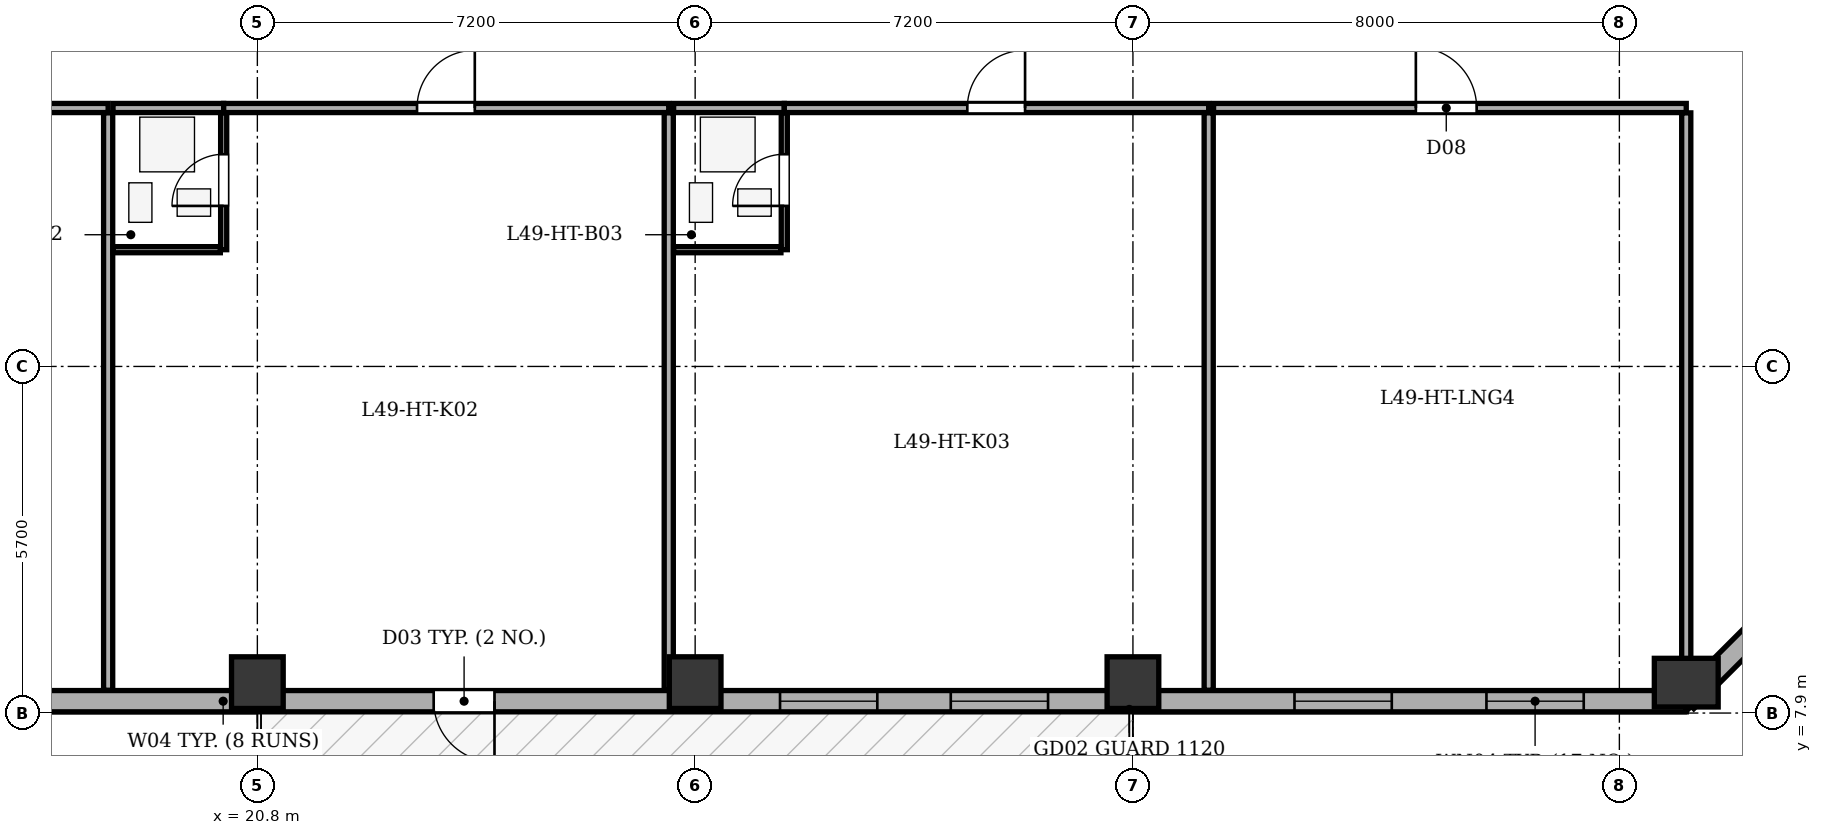
"""IFC4 building model, lengths in metres.
Left out: names, types, materials, properties, quantities, classifications, styles, units other than length and angle.
Written with IfcOpenShell. Run it as: python <this file> out.ifc"""

import sys

from ifc_helpers import new_model, si_unit, direction, frame, frame_2d, origin, origin_2d, place, context, subcontext, project, spatial, rectangle, extrude, element, fill, save


model = new_model("IFC4")
c1 = context("Model", 3, precision=1e-05, world=origin(), true_north=direction((0.0, 1.0)))
c2 = subcontext(c1, "Body", "Model", "MODEL_VIEW")
j1 = project(units=[si_unit("LENGTHUNIT", "METRE"), si_unit("PLANEANGLEUNIT", "RADIAN")], contexts=[c1])
p1 = place(None, origin())
s1 = spatial("IfcSite", under=j1, at=p1, CompositionType="ELEMENT")
p2 = place(p1, origin())
s2 = spatial("IfcBuilding", under=s1, at=p2, CompositionType="ELEMENT")
p3 = place(p2, frame((0.0, 0.0, 190.3)))
s3 = spatial("IfcBuildingStorey", under=s2, at=p3, CompositionType="ELEMENT", Elevation=190.3)
for number, where, z_axis, x_axis in (
    (1, (20.8, 8.4, 0.0), (0.0, 0.0, 1.0), (1.0, 0.0, 0.0)),
    (2, (28.0, 8.4, 0.0), (0.0, 0.0, 1.0), (1.0, 0.0, 0.0)),
    (3, (35.2, 8.4, 0.0), (0.0, 0.0, 1.0), (1.0, 0.0, 0.0)),
):
    element("IfcColumn", number, at=place(p3, frame(where, z_axis=z_axis, x_axis=x_axis)), inside=s3, PredefinedType="COLUMN", context=c2, shape_type="SweptSolid", body=[
        extrude(rectangle(XDim=0.85, YDim=0.85, at=origin_2d()), origin(), (0.0, 0.0, 1.0), 3.5),
    ])
p4 = place(p3, frame((44.3, 8.4, 0.0), z_axis=(0.0, 0.0, 1.0), x_axis=(1.0, 0.0, 0.0)))
e4 = element("IfcColumn", 4, at=p4, inside=s3, PredefinedType="COLUMN", context=c2, shape_type="SweptSolid", body=[
    extrude(rectangle(XDim=0.8, YDim=1.05, at=origin_2d()), origin(), (0.0, 0.0, 1.0), 3.5),
])
p5 = place(p3, frame((44.3, 8.095, 0.0), z_axis=(0.0, 0.0, 1.0), x_axis=(-1.0, 0.0, 0.0)))
e5 = element("IfcWall", 5, at=p5, inside=s3, PredefinedType="STANDARD", context=c2, shape_type="SweptSolid", body=[
    extrude(rectangle(XDim=35.0, YDim=0.35, at=frame_2d((17.5, 0.0))), origin(), (0.0, 0.0, 1.0), 2.785),
])
p6 = place(p5, frame((19.6, 0.0, 0.0)))
e6 = element("IfcOpeningElement", 6, at=p6, cuts=e5, PredefinedType="OPENING", context=c2, shape_type="SweptSolid", body=[
    extrude(rectangle(XDim=1.0, YDim=2.02, at=frame_2d((0.5, 1.01))), frame((0.0, 0.185, 0.0), z_axis=(0.0, -1.0, 0.0), x_axis=(1.0, 0.0, 0.0)), (0.0, 0.0, 1.0), 0.37),
])
p7 = place(p5, frame((1.686, 0.0, 0.75)))
e7 = element("IfcOpeningElement", 7, at=p7, cuts=e5, PredefinedType="OPENING", context=c2, shape_type="SweptSolid", body=[
    extrude(rectangle(XDim=1.6, YDim=1.75, at=frame_2d((0.8, 0.875))), frame((0.0, 0.185, 0.0), z_axis=(0.0, -1.0, 0.0), x_axis=(1.0, 0.0, 0.0)), (0.0, 0.0, 1.0), 0.37),
])
p8 = place(p5, frame((4.843, 0.0, 0.75)))
e8 = element("IfcOpeningElement", 8, at=p8, cuts=e5, PredefinedType="OPENING", context=c2, shape_type="SweptSolid", body=[
    extrude(rectangle(XDim=1.6, YDim=1.75, at=frame_2d((0.8, 0.875))), frame((0.0, 0.185, 0.0), z_axis=(0.0, -1.0, 0.0), x_axis=(1.0, 0.0, 0.0)), (0.0, 0.0, 1.0), 0.37),
])
p9 = place(p5, frame((10.496, 0.0, 0.75)))
e9 = element("IfcOpeningElement", 9, at=p9, cuts=e5, PredefinedType="OPENING", context=c2, shape_type="SweptSolid", body=[
    extrude(rectangle(XDim=1.6, YDim=1.75, at=frame_2d((0.8, 0.875))), frame((0.0, 0.185, 0.0), z_axis=(0.0, -1.0, 0.0), x_axis=(1.0, 0.0, 0.0)), (0.0, 0.0, 1.0), 0.37),
])
p10 = place(p5, frame((13.304, 0.0, 0.75)))
e10 = element("IfcOpeningElement", 10, at=p10, cuts=e5, PredefinedType="OPENING", context=c2, shape_type="SweptSolid", body=[
    extrude(rectangle(XDim=1.6, YDim=1.75, at=frame_2d((0.8, 0.875))), frame((0.0, 0.185, 0.0), z_axis=(0.0, -1.0, 0.0), x_axis=(1.0, 0.0, 0.0)), (0.0, 0.0, 1.0), 0.37),
])
p11 = place(p5, frame((27.525, 0.0, 0.75)))
e11 = element("IfcOpeningElement", 11, at=p11, cuts=e5, PredefinedType="OPENING", context=c2, shape_type="SweptSolid", body=[
    extrude(rectangle(XDim=1.6, YDim=1.75, at=frame_2d((0.8, 0.875))), frame((0.0, 0.185, 0.0), z_axis=(0.0, -1.0, 0.0), x_axis=(1.0, 0.0, 0.0)), (0.0, 0.0, 1.0), 0.37),
])
p12 = place(p5, frame((30.729, 0.0, 0.75)))
e12 = element("IfcOpeningElement", 12, at=p12, cuts=e5, PredefinedType="OPENING", context=c2, shape_type="SweptSolid", body=[
    extrude(rectangle(XDim=2.1, YDim=1.75, at=frame_2d((1.05, 0.875))), frame((0.0, 0.185, 0.0), z_axis=(0.0, -1.0, 0.0), x_axis=(1.0, 0.0, 0.0)), (0.0, 0.0, 1.0), 0.37),
])
p13 = place(p3, frame((49.105, 12.9, 0.0), z_axis=(0.0, 0.0, 1.0), x_axis=(-0.707106781187, -0.707106781187, 0.0)))
e13 = element("IfcWall", 13, at=p13, inside=s3, PredefinedType="STANDARD", context=c2, shape_type="SweptSolid", body=[
    extrude(rectangle(XDim=6.795, YDim=0.35, at=frame_2d((3.397, 0.0))), origin(), (0.0, 0.0, 1.0), 2.785),
])
p14 = place(p13, frame((2.698, 0.0, 0.75)))
e14 = element("IfcOpeningElement", 14, at=p14, cuts=e13, PredefinedType="OPENING", context=c2, shape_type="SweptSolid", body=[
    extrude(rectangle(XDim=1.4, YDim=1.65, at=frame_2d((0.7, 0.825))), frame((0.0, 0.185, 0.0), z_axis=(0.0, -1.0, 0.0), x_axis=(1.0, 0.0, 0.0)), (0.0, 0.0, 1.0), 0.37),
])
p15 = place(p3, frame((12.05, 17.85, 0.0), z_axis=(0.0, 0.0, 1.0), x_axis=(1.0, 0.0, 0.0)))
e15 = element("IfcWall", 15, at=p15, inside=s3, PredefinedType="PARTITIONING", context=c2, shape_type="SweptSolid", body=[
    extrude(rectangle(XDim=6.296, YDim=0.15, at=frame_2d((3.148, 0.0))), origin(), (0.0, 0.0, 1.0), 3.2),
])
p16 = place(p15, frame((2.668, 0.0, 0.0)))
e16 = element("IfcOpeningElement", 16, at=p16, cuts=e15, PredefinedType="OPENING", context=c2, shape_type="SweptSolid", body=[
    extrude(rectangle(XDim=0.95, YDim=2.1, at=frame_2d((0.475, 1.05))), frame((0.0, 0.085, 0.0), z_axis=(0.0, -1.0, 0.0), x_axis=(1.0, 0.0, 0.0)), (0.0, 0.0, 1.0), 0.17),
])
p17 = place(p3, frame((18.346, 8.275, 0.0), z_axis=(0.0, 0.0, 1.0), x_axis=(0.0, 1.0, 0.0)))
e17 = element("IfcWall", 17, at=p17, inside=s3, PredefinedType="PARTITIONING", context=c2, shape_type="SweptSolid", body=[
    extrude(rectangle(XDim=9.495, YDim=0.15, at=frame_2d((4.748, 0.0))), origin(), (0.0, 0.0, 1.0), 3.2),
])
p18 = place(p3, frame((18.426, 17.85, 0.0), z_axis=(0.0, 0.0, 1.0), x_axis=(1.0, 0.0, 0.0)))
e18 = element("IfcWall", 18, at=p18, inside=s3, PredefinedType="PARTITIONING", context=c2, shape_type="SweptSolid", body=[
    extrude(rectangle(XDim=1.82, YDim=0.15, at=frame_2d((0.91, 0.0))), origin(), (0.0, 0.0, 1.0), 3.2),
])
p19 = place(p3, frame((20.246, 17.85, 0.0), z_axis=(0.0, 0.0, 1.0), x_axis=(1.0, 0.0, 0.0)))
e19 = element("IfcWall", 19, at=p19, inside=s3, PredefinedType="PARTITIONING", context=c2, shape_type="SweptSolid", body=[
    extrude(rectangle(XDim=7.32, YDim=0.15, at=frame_2d((3.66, 0.0))), origin(), (0.0, 0.0, 1.0), 3.2),
])
p20 = place(p19, frame((3.18, 0.0, 0.0)))
e20 = element("IfcOpeningElement", 20, at=p20, cuts=e19, PredefinedType="OPENING", context=c2, shape_type="SweptSolid", body=[
    extrude(rectangle(XDim=0.95, YDim=2.1, at=frame_2d((0.475, 1.05))), frame((0.0, 0.085, 0.0), z_axis=(0.0, -1.0, 0.0), x_axis=(1.0, 0.0, 0.0)), (0.0, 0.0, 1.0), 0.17),
])
p21 = place(p3, frame((20.246, 15.52, 0.0), z_axis=(0.0, 0.0, 1.0), x_axis=(0.0, 1.0, 0.0)))
e21 = element("IfcWall", 21, at=p21, inside=s3, PredefinedType="PARTITIONING", context=c2, shape_type="SweptSolid", body=[
    extrude(rectangle(XDim=2.25, YDim=0.1, at=frame_2d((1.125, 0.0))), origin(), (0.0, 0.0, 1.0), 3.2),
])
p22 = place(p21, frame((0.72, 0.0, 0.0)))
e22 = element("IfcOpeningElement", 22, at=p22, cuts=e21, PredefinedType="OPENING", context=c2, shape_type="SweptSolid", body=[
    extrude(rectangle(XDim=0.85, YDim=2.05, at=frame_2d((0.425, 1.025))), frame((0.0, 0.06, 0.0), z_axis=(0.0, -1.0, 0.0), x_axis=(1.0, 0.0, 0.0)), (0.0, 0.0, 1.0), 0.12),
])
p23 = place(p3, frame((18.426, 15.52, 0.0), z_axis=(0.0, 0.0, 1.0), x_axis=(1.0, 0.0, 0.0)))
e23 = element("IfcWall", 23, at=p23, inside=s3, PredefinedType="PARTITIONING", context=c2, shape_type="SweptSolid", body=[
    extrude(rectangle(XDim=1.765, YDim=0.1, at=frame_2d((0.882, 0.0))), origin(), (0.0, 0.0, 1.0), 3.2),
])
p24 = place(p3, frame((27.566, 8.275, 0.0), z_axis=(0.0, 0.0, 1.0), x_axis=(0.0, 1.0, 0.0)))
e24 = element("IfcWall", 24, at=p24, inside=s3, PredefinedType="PARTITIONING", context=c2, shape_type="SweptSolid", body=[
    extrude(rectangle(XDim=9.495, YDim=0.15, at=frame_2d((4.748, 0.0))), origin(), (0.0, 0.0, 1.0), 3.2),
])
p25 = place(p3, frame((27.646, 17.85, 0.0), z_axis=(0.0, 0.0, 1.0), x_axis=(1.0, 0.0, 0.0)))
e25 = element("IfcWall", 25, at=p25, inside=s3, PredefinedType="PARTITIONING", context=c2, shape_type="SweptSolid", body=[
    extrude(rectangle(XDim=1.82, YDim=0.15, at=frame_2d((0.91, 0.0))), origin(), (0.0, 0.0, 1.0), 3.2),
])
p26 = place(p3, frame((29.466, 17.85, 0.0), z_axis=(0.0, 0.0, 1.0), x_axis=(1.0, 0.0, 0.0)))
e26 = element("IfcWall", 26, at=p26, inside=s3, PredefinedType="PARTITIONING", context=c2, shape_type="SweptSolid", body=[
    extrude(rectangle(XDim=6.98, YDim=0.15, at=frame_2d((3.49, 0.0))), origin(), (0.0, 0.0, 1.0), 3.2),
])
p27 = place(p26, frame((3.01, 0.0, 0.0)))
e27 = element("IfcOpeningElement", 27, at=p27, cuts=e26, PredefinedType="OPENING", context=c2, shape_type="SweptSolid", body=[
    extrude(rectangle(XDim=0.95, YDim=2.1, at=frame_2d((0.475, 1.05))), frame((0.0, 0.085, 0.0), z_axis=(0.0, -1.0, 0.0), x_axis=(1.0, 0.0, 0.0)), (0.0, 0.0, 1.0), 0.17),
])
p28 = place(p3, frame((29.466, 15.52, 0.0), z_axis=(0.0, 0.0, 1.0), x_axis=(0.0, 1.0, 0.0)))
e28 = element("IfcWall", 28, at=p28, inside=s3, PredefinedType="PARTITIONING", context=c2, shape_type="SweptSolid", body=[
    extrude(rectangle(XDim=2.25, YDim=0.1, at=frame_2d((1.125, 0.0))), origin(), (0.0, 0.0, 1.0), 3.2),
])
p29 = place(p28, frame((0.72, 0.0, 0.0)))
e29 = element("IfcOpeningElement", 29, at=p29, cuts=e28, PredefinedType="OPENING", context=c2, shape_type="SweptSolid", body=[
    extrude(rectangle(XDim=0.85, YDim=2.05, at=frame_2d((0.425, 1.025))), frame((0.0, 0.06, 0.0), z_axis=(0.0, -1.0, 0.0), x_axis=(1.0, 0.0, 0.0)), (0.0, 0.0, 1.0), 0.12),
])
p30 = place(p3, frame((27.646, 15.52, 0.0), z_axis=(0.0, 0.0, 1.0), x_axis=(1.0, 0.0, 0.0)))
e30 = element("IfcWall", 30, at=p30, inside=s3, PredefinedType="PARTITIONING", context=c2, shape_type="SweptSolid", body=[
    extrude(rectangle(XDim=1.765, YDim=0.1, at=frame_2d((0.882, 0.0))), origin(), (0.0, 0.0, 1.0), 3.2),
])
p31 = place(p3, frame((36.446, 8.275, 0.0), z_axis=(0.0, 0.0, 1.0), x_axis=(0.0, 1.0, 0.0)))
e31 = element("IfcWall", 31, at=p31, inside=s3, PredefinedType="PARTITIONING", context=c2, shape_type="SweptSolid", body=[
    extrude(rectangle(XDim=9.495, YDim=0.15, at=frame_2d((4.748, 0.0))), origin(), (0.0, 0.0, 1.0), 3.2),
])
p32 = place(p3, frame((36.526, 17.85, 0.0), z_axis=(0.0, 0.0, 1.0), x_axis=(1.0, 0.0, 0.0)))
e32 = element("IfcWall", 32, at=p32, inside=s3, PredefinedType="PARTITIONING", context=c2, shape_type="SweptSolid", body=[
    extrude(rectangle(XDim=7.774, YDim=0.15, at=frame_2d((3.887, 0.0))), origin(), (0.0, 0.0, 1.0), 3.2),
])
p33 = place(p32, frame((3.327, 0.0, 0.0)))
e33 = element("IfcOpeningElement", 33, at=p33, cuts=e32, PredefinedType="OPENING", context=c2, shape_type="SweptSolid", body=[
    extrude(rectangle(XDim=1.0, YDim=2.1, at=frame_2d((0.5, 1.05))), frame((0.0, 0.085, 0.0), z_axis=(0.0, -1.0, 0.0), x_axis=(1.0, 0.0, 0.0)), (0.0, 0.0, 1.0), 0.17),
])
p34 = place(p3, frame((44.3, 8.275, 0.0), z_axis=(0.0, 0.0, 1.0), x_axis=(0.0, 1.0, 0.0)))
e34 = element("IfcWall", 34, at=p34, inside=s3, PredefinedType="PARTITIONING", context=c2, shape_type="SweptSolid", body=[
    extrude(rectangle(XDim=9.495, YDim=0.15, at=frame_2d((4.748, 0.0))), origin(), (0.0, 0.0, 1.0), 3.2),
])
p35 = place(p6, origin())
e35 = element("IfcDoor", 35, at=p35, inside=s3, OperationType="SINGLE_SWING_LEFT", PredefinedType="DOOR", context=c2, shape_type="SweptSolid", body=[
    extrude(rectangle(XDim=1.0, YDim=2.02, at=frame_2d((0.5, 1.01))), frame((0.0, 0.025, 0.0), z_axis=(0.0, -1.0, 0.0), x_axis=(1.0, 0.0, 0.0)), (0.0, 0.0, 1.0), 0.05),
])
fill(e6, e35)
p36 = place(p7, origin())
e36 = element("IfcWindow", 36, at=p36, inside=s3, PartitioningType="SINGLE_PANEL", PredefinedType="WINDOW", context=c2, shape_type="SweptSolid", body=[
    extrude(rectangle(XDim=1.6, YDim=1.75, at=frame_2d((0.8, 0.875))), frame((0.0, -0.01, 0.0), z_axis=(0.0, -1.0, 0.0), x_axis=(1.0, 0.0, 0.0)), (0.0, 0.0, 1.0), 0.06),
])
fill(e7, e36)
p37 = place(p8, origin())
e37 = element("IfcWindow", 37, at=p37, inside=s3, PartitioningType="SINGLE_PANEL", PredefinedType="WINDOW", context=c2, shape_type="SweptSolid", body=[
    extrude(rectangle(XDim=1.6, YDim=1.75, at=frame_2d((0.8, 0.875))), frame((0.0, -0.01, 0.0), z_axis=(0.0, -1.0, 0.0), x_axis=(1.0, 0.0, 0.0)), (0.0, 0.0, 1.0), 0.06),
])
fill(e8, e37)
p38 = place(p9, origin())
e38 = element("IfcWindow", 38, at=p38, inside=s3, PartitioningType="SINGLE_PANEL", PredefinedType="WINDOW", context=c2, shape_type="SweptSolid", body=[
    extrude(rectangle(XDim=1.6, YDim=1.75, at=frame_2d((0.8, 0.875))), frame((0.0, -0.01, 0.0), z_axis=(0.0, -1.0, 0.0), x_axis=(1.0, 0.0, 0.0)), (0.0, 0.0, 1.0), 0.06),
])
fill(e9, e38)
p39 = place(p10, origin())
e39 = element("IfcWindow", 39, at=p39, inside=s3, PartitioningType="SINGLE_PANEL", PredefinedType="WINDOW", context=c2, shape_type="SweptSolid", body=[
    extrude(rectangle(XDim=1.6, YDim=1.75, at=frame_2d((0.8, 0.875))), frame((0.0, -0.01, 0.0), z_axis=(0.0, -1.0, 0.0), x_axis=(1.0, 0.0, 0.0)), (0.0, 0.0, 1.0), 0.06),
])
fill(e10, e39)
p40 = place(p22, origin())
e40 = element("IfcDoor", 40, at=p40, inside=s3, OperationType="SINGLE_SWING_LEFT", PredefinedType="DOOR", context=c2, shape_type="SweptSolid", body=[
    extrude(rectangle(XDim=0.85, YDim=2.05, at=frame_2d((0.425, 1.025))), frame((0.0, 0.025, 0.0), z_axis=(0.0, -1.0, 0.0), x_axis=(1.0, 0.0, 0.0)), (0.0, 0.0, 1.0), 0.05),
])
fill(e22, e40)
p41 = place(p20, origin())
e41 = element("IfcDoor", 41, at=p41, inside=s3, OperationType="SINGLE_SWING_RIGHT", PredefinedType="DOOR", context=c2, shape_type="SweptSolid", body=[
    extrude(rectangle(XDim=0.95, YDim=2.1, at=frame_2d((0.475, 1.05))), frame((0.0, 0.025, 0.0), z_axis=(0.0, -1.0, 0.0), x_axis=(1.0, 0.0, 0.0)), (0.0, 0.0, 1.0), 0.05),
])
fill(e20, e41)
p42 = place(p29, origin())
e42 = element("IfcDoor", 42, at=p42, inside=s3, OperationType="SINGLE_SWING_LEFT", PredefinedType="DOOR", context=c2, shape_type="SweptSolid", body=[
    extrude(rectangle(XDim=0.85, YDim=2.05, at=frame_2d((0.425, 1.025))), frame((0.0, 0.025, 0.0), z_axis=(0.0, -1.0, 0.0), x_axis=(1.0, 0.0, 0.0)), (0.0, 0.0, 1.0), 0.05),
])
fill(e29, e42)
p43 = place(p27, origin())
e43 = element("IfcDoor", 43, at=p43, inside=s3, OperationType="SINGLE_SWING_RIGHT", PredefinedType="DOOR", context=c2, shape_type="SweptSolid", body=[
    extrude(rectangle(XDim=0.95, YDim=2.1, at=frame_2d((0.475, 1.05))), frame((0.0, 0.025, 0.0), z_axis=(0.0, -1.0, 0.0), x_axis=(1.0, 0.0, 0.0)), (0.0, 0.0, 1.0), 0.05),
])
fill(e27, e43)
p44 = place(p33, origin())
e44 = element("IfcDoor", 44, at=p44, inside=s3, OperationType="SINGLE_SWING_LEFT", PredefinedType="DOOR", context=c2, shape_type="SweptSolid", body=[
    extrude(rectangle(XDim=1.0, YDim=2.1, at=frame_2d((0.5, 1.05))), frame((0.0, 0.025, 0.0), z_axis=(0.0, -1.0, 0.0), x_axis=(1.0, 0.0, 0.0)), (0.0, 0.0, 1.0), 0.05),
])
fill(e33, e44)
save(model, sys.argv[1])
